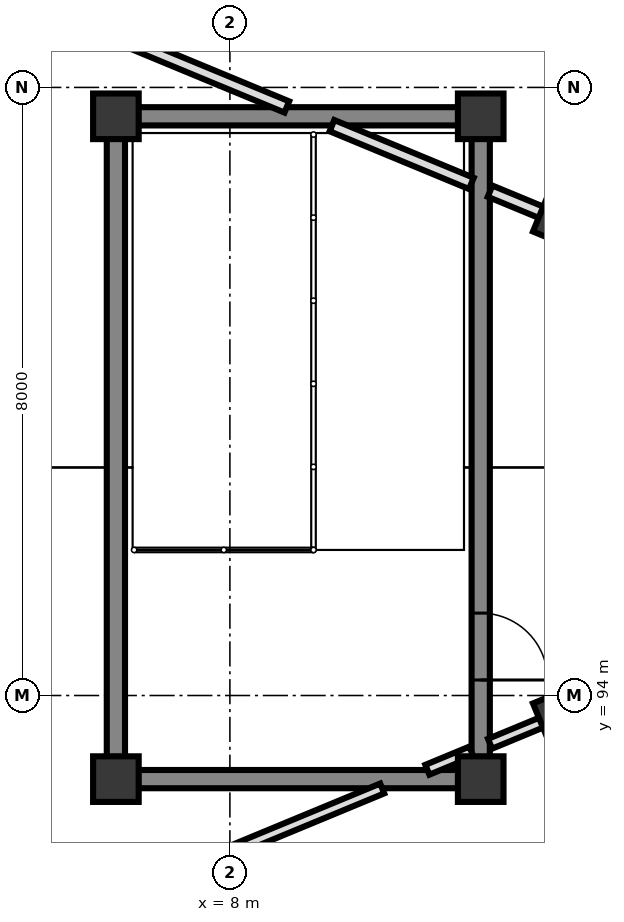
"""IFC4 building model, lengths in metres.
Left out: names, types, materials, properties, quantities, classifications, styles, units other than length and angle.
Written with IfcOpenShell. Run it as: python <this file> out.ifc"""

import sys

from ifc_helpers import new_model, si_unit, direction, frame, frame_2d, origin, origin_2d, place, context, subcontext, project, spatial, rectangle, extrude, element, fill, save


model = new_model("IFC4")
c1 = context("Model", 3, precision=1e-05, world=origin(), true_north=direction((0.0, 1.0)))
c2 = subcontext(c1, "Body", "Model", "MODEL_VIEW")
j1 = project(units=[si_unit("LENGTHUNIT", "METRE"), si_unit("PLANEANGLEUNIT", "RADIAN")], contexts=[c1])
p1 = place(None, origin())
s1 = spatial("IfcSite", under=j1, at=p1, CompositionType="ELEMENT")
p2 = place(p1, origin())
s2 = spatial("IfcBuilding", under=s1, at=p2, CompositionType="ELEMENT")
p3 = place(p2, frame((0.0, 0.0, 12.5)))
s3 = spatial("IfcBuildingStorey", under=s2, at=p3, CompositionType="ELEMENT", Elevation=12.5)
for number, where, z_axis, x_axis in (
    (1, (6.5, 92.9, 0.0), (0.0, 0.0, 1.0), (1.0, 0.0, 0.0)),
    (2, (11.3, 92.9, 0.0), (0.0, 0.0, 1.0), (1.0, 0.0, 0.0)),
    (3, (11.3, 101.62, 0.0), (0.0, 0.0, 1.0), (1.0, 0.0, 0.0)),
    (4, (6.5, 101.62, 0.0), (0.0, 0.0, 1.0), (1.0, 0.0, 0.0)),
):
    element("IfcColumn", number, at=place(p3, frame(where, z_axis=z_axis, x_axis=x_axis)), inside=s3, PredefinedType="COLUMN", context=c2, shape_type="SweptSolid", body=[
        extrude(rectangle(XDim=0.6, YDim=0.6, at=origin_2d()), origin(), (0.0, 0.0, 1.0), 4.0),
    ])
for number, where, z_axis, x_axis in (
    (5, (12.347, 100.253, 0.0), (0.0, 0.0, 1.0), (-0.924, 0.383, 0.0)),
    (6, (12.347, 93.747, 0.0), (0.0, 0.0, 1.0), (-0.924, -0.383, 0.0)),
):
    element("IfcColumn", number, at=place(p3, frame(where, z_axis=z_axis, x_axis=x_axis)), inside=s3, PredefinedType="COLUMN", context=c2, shape_type="SweptSolid", body=[
        extrude(rectangle(XDim=0.55, YDim=0.55, at=origin_2d()), origin(), (0.0, 0.0, 1.0), 4.49),
    ])
p4 = place(p3, frame((6.5, 93.192, 0.0), z_axis=(0.0, 0.0, 1.0), x_axis=(0.0, 1.0, 0.0)))
e7 = element("IfcWall", 7, at=p4, inside=s3, PredefinedType="SHEAR", context=c2, shape_type="SweptSolid", body=[
    extrude(rectangle(XDim=8.136, YDim=0.24, at=frame_2d((4.068, 0.0))), origin(), (0.0, 0.0, 1.0), 3.74),
])
p5 = place(p3, frame((11.3, 101.328, 0.0), z_axis=(0.0, 0.0, 1.0), x_axis=(0.0, -1.0, 0.0)))
e8 = element("IfcWall", 8, at=p5, inside=s3, PredefinedType="SHEAR", context=c2, shape_type="SweptSolid", body=[
    extrude(rectangle(XDim=8.136, YDim=0.24, at=frame_2d((4.068, 0.0))), origin(), (0.0, 0.0, 1.0), 3.74),
])
p6 = place(p5, frame((6.244, 0.0, 0.0)))
e9 = element("IfcOpeningElement", 9, at=p6, cuts=e8, PredefinedType="OPENING", context=c2, shape_type="SweptSolid", body=[
    extrude(rectangle(XDim=0.88, YDim=2.1, at=frame_2d((0.44, 1.05))), frame((0.0, 0.13, 0.0), z_axis=(0.0, -1.0, 0.0), x_axis=(1.0, 0.0, 0.0)), (0.0, 0.0, 1.0), 0.26),
])
for number, where, z_axis, x_axis in (
    (10, (11.008, 92.9, 0.0), (0.0, 0.0, 1.0), (-1.0, 0.0, 0.0)),
    (11, (11.008, 101.62, 0.0), (0.0, 0.0, 1.0), (-1.0, 0.0, 0.0)),
):
    element("IfcWall", number, at=place(p3, frame(where, z_axis=z_axis, x_axis=x_axis)), inside=s3, PredefinedType="SHEAR", context=c2, shape_type="SweptSolid", body=[
        extrude(rectangle(XDim=4.216, YDim=0.24, at=frame_2d((2.108, 0.0))), origin(), (0.0, 0.0, 1.0), 3.74),
    ])
p7 = place(p3, frame((12.1, 100.355, 0.0), z_axis=(0.0, 0.0, 1.0), x_axis=(-0.924069600435, 0.382224245113, 0.0)))
e12 = element("IfcWall", 12, at=p7, inside=s3, PredefinedType="PARTITIONING", context=c2, shape_type="SweptSolid", body=[
    extrude(rectangle(XDim=0.733, YDim=0.16, at=frame_2d((0.366, 0.0))), origin(), (0.0, 0.0, 1.0), 3.7),
])
p8 = place(p3, frame((11.177, 100.737, 0.0), z_axis=(0.0, 0.0, 1.0), x_axis=(-0.923817443679, 0.382833293686, 0.0)))
e13 = element("IfcWall", 13, at=p8, inside=s3, PredefinedType="PARTITIONING", context=c2, shape_type="SweptSolid", body=[
    extrude(rectangle(XDim=1.985, YDim=0.16, at=frame_2d((0.993, 0.0))), origin(), (0.0, 0.0, 1.0), 3.7),
])
p9 = place(p3, frame((8.749, 101.743, 0.0), z_axis=(0.0, 0.0, 1.0), x_axis=(-0.923877739946, 0.382687759972, 0.0)))
e14 = element("IfcWall", 14, at=p9, inside=s3, PredefinedType="PARTITIONING", context=c2, shape_type="SweptSolid", body=[
    extrude(rectangle(XDim=4.813, YDim=0.16, at=frame_2d((2.407, 0.0))), origin(), (0.0, 0.0, 1.0), 3.7),
])
p10 = place(p3, frame((12.1, 93.645, 0.0), z_axis=(0.0, 0.0, 1.0), x_axis=(-0.924069600435, -0.382224245113, 0.0)))
e15 = element("IfcWall", 15, at=p10, inside=s3, PredefinedType="PARTITIONING", context=c2, shape_type="SweptSolid", body=[
    extrude(rectangle(XDim=0.733, YDim=0.14, at=frame_2d((0.366, 0.0))), origin(), (0.0, 0.0, 1.0), 3.7),
])
p11 = place(p3, frame((11.177, 93.263, 0.0), z_axis=(0.0, 0.0, 1.0), x_axis=(-0.923812676193, -0.382844797933, 0.0)))
e16 = element("IfcWall", 16, at=p11, inside=s3, PredefinedType="PARTITIONING", context=c2, shape_type="SweptSolid", body=[
    extrude(rectangle(XDim=0.627, YDim=0.14, at=frame_2d((0.313, 0.0))), origin(), (0.0, 0.0, 1.0), 3.7),
])
p12 = place(p3, frame((10.004, 92.777, 0.0), z_axis=(0.0, 0.0, 1.0), x_axis=(-0.923864955254, -0.382718623082, 0.0)))
e17 = element("IfcWall", 17, at=p12, inside=s3, PredefinedType="PARTITIONING", context=c2, shape_type="SweptSolid", body=[
    extrude(rectangle(XDim=6.172, YDim=0.14, at=frame_2d((3.086, 0.0))), origin(), (0.0, 0.0, 1.0), 3.7),
])
p13 = place(p6, origin())
e18 = element("IfcDoor", 18, at=p13, inside=s3, OperationType="SINGLE_SWING_RIGHT", PredefinedType="DOOR", context=c2, shape_type="SweptSolid", body=[
    extrude(rectangle(XDim=0.88, YDim=2.1, at=frame_2d((0.44, 1.05))), frame((0.0, 0.025, 0.0), z_axis=(0.0, -1.0, 0.0), x_axis=(1.0, 0.0, 0.0)), (0.0, 0.0, 1.0), 0.05),
])
fill(e9, e18)
save(model, sys.argv[1])
